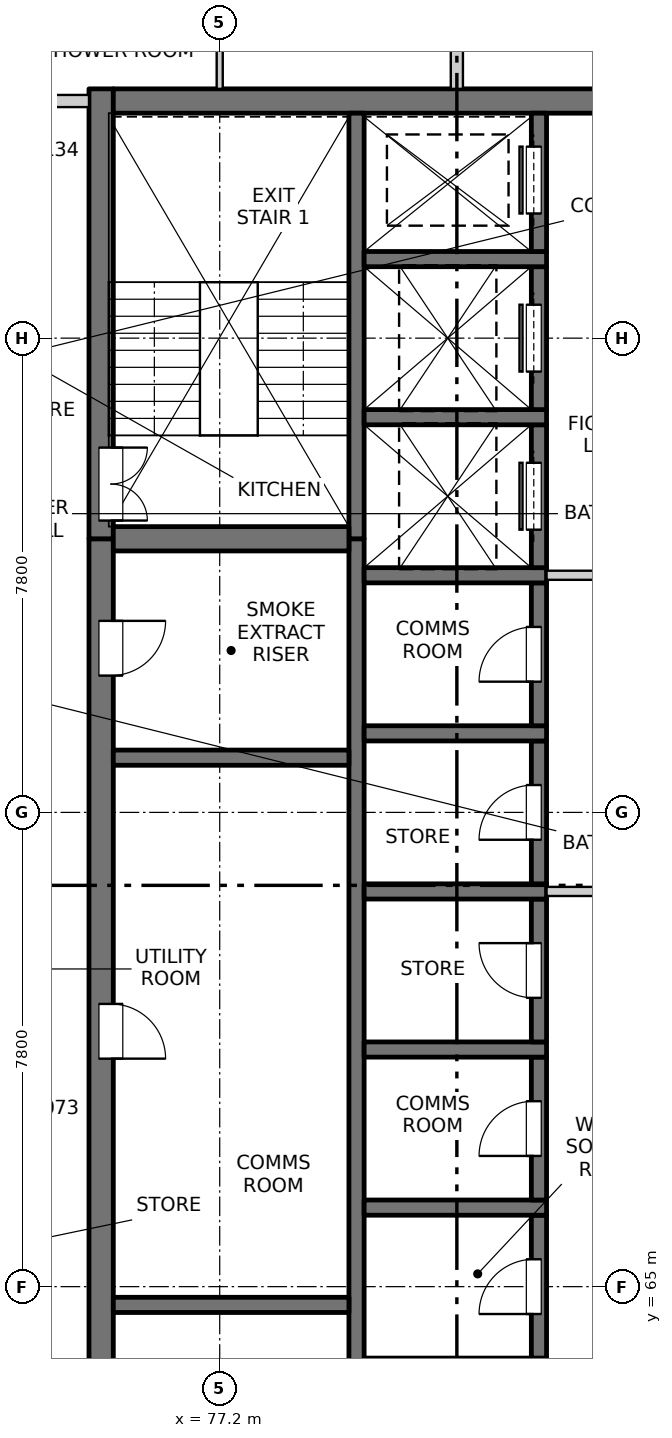
"""IFC4 building model, lengths in metres.
Left out: names, types, materials, properties, quantities, classifications, styles, units other than length and angle.
Written with IfcOpenShell. Run it as: python <this file> out.ifc"""

import sys

from ifc_helpers import new_model, si_unit, direction, frame, frame_2d, origin, place, context, subcontext, project, spatial, rectangle, extrude, element, fill, save


model = new_model("IFC4")
c1 = context("Model", 3, precision=1e-05, world=origin(), true_north=direction((0.0, 1.0)))
c2 = subcontext(c1, "Body", "Model", "MODEL_VIEW")
j1 = project(units=[si_unit("LENGTHUNIT", "METRE"), si_unit("PLANEANGLEUNIT", "RADIAN")], contexts=[c1])
p1 = place(None, origin())
s1 = spatial("IfcSite", under=j1, at=p1, CompositionType="ELEMENT")
p2 = place(p1, origin())
s2 = spatial("IfcBuilding", under=s1, at=p2, CompositionType="ELEMENT")
p3 = place(p2, frame((0.0, 0.0, 197.3)))
s3 = spatial("IfcBuildingStorey", under=s2, at=p3, CompositionType="ELEMENT", Elevation=197.3)
p4 = place(p3, frame((75.25, 55.05, -0.3), z_axis=(0.0, 0.0, 1.0), x_axis=(0.0, 1.0, 0.0)))
e1 = element("IfcWall", 1, at=p4, inside=s3, PredefinedType="SOLIDWALL", context=c2, shape_type="SweptSolid", body=[
    extrude(rectangle(XDim=22.25, YDim=0.4, at=frame_2d((11.125, 0.0))), origin(), (0.0, 0.0, 1.0), 3.45),
])
p5 = place(p4, frame((7.4, 0.0, 0.3)))
e2 = element("IfcOpeningElement", 2, at=p5, cuts=e1, PredefinedType="OPENING", context=c2, shape_type="SweptSolid", body=[
    extrude(rectangle(XDim=0.9, YDim=2.1, at=frame_2d((0.45, 1.05))), frame((0.0, 0.21, 0.0), z_axis=(0.0, -1.0, 0.0), x_axis=(1.0, 0.0, 0.0)), (0.0, 0.0, 1.0), 0.42),
])
p6 = place(p4, frame((13.7, 0.0, 0.3)))
e3 = element("IfcOpeningElement", 3, at=p6, cuts=e1, PredefinedType="OPENING", context=c2, shape_type="SweptSolid", body=[
    extrude(rectangle(XDim=0.9, YDim=2.1, at=frame_2d((0.45, 1.05))), frame((0.0, 0.21, 0.0), z_axis=(0.0, -1.0, 0.0), x_axis=(1.0, 0.0, 0.0)), (0.0, 0.0, 1.0), 0.42),
])
p7 = place(p4, frame((20.0, 0.0, 0.3)))
e4 = element("IfcOpeningElement", 4, at=p7, cuts=e1, PredefinedType="OPENING", context=c2, shape_type="SweptSolid", body=[
    extrude(rectangle(XDim=0.9, YDim=2.1, at=frame_2d((0.45, 1.05))), frame((0.0, 0.21, 0.0), z_axis=(0.0, -1.0, 0.0), x_axis=(1.0, 0.0, 0.0)), (0.0, 0.0, 1.0), 0.42),
])
p8 = place(p3, frame((75.25, 77.3, -0.3), z_axis=(0.0, 0.0, 1.0), x_axis=(0.0, 1.0, 0.0)))
e5 = element("IfcWall", 5, at=p8, inside=s3, PredefinedType="SOLIDWALL", context=c2, shape_type="SweptSolid", body=[
    extrude(rectangle(XDim=7.4, YDim=0.4, at=frame_2d((3.7, 0.0))), origin(), (0.0, 0.0, 1.0), 3.45),
])
p9 = place(p8, frame((0.3, 0.0, 0.3)))
e6 = element("IfcOpeningElement", 6, at=p9, cuts=e5, PredefinedType="OPENING", context=c2, shape_type="SweptSolid", body=[
    extrude(rectangle(XDim=1.2, YDim=2.1, at=frame_2d((0.6, 1.05))), frame((0.0, 0.21, 0.0), z_axis=(0.0, -1.0, 0.0), x_axis=(1.0, 0.0, 0.0)), (0.0, 0.0, 1.0), 0.42),
])
p10 = place(p3, frame((75.45, 84.5, -0.3), z_axis=(0.0, 0.0, 1.0), x_axis=(1.0, 0.0, 0.0)))
e7 = element("IfcWall", 7, at=p10, inside=s3, PredefinedType="SOLIDWALL", context=c2, shape_type="SweptSolid", body=[
    extrude(rectangle(XDim=19.1, YDim=0.4, at=frame_2d((9.55, 0.0))), origin(), (0.0, 0.0, 1.0), 3.45),
])
p11 = place(p3, frame((79.45, 60.975, -0.3), z_axis=(0.0, 0.0, 1.0), x_axis=(0.0, 1.0, 0.0)))
e8 = element("IfcWall", 8, at=p11, inside=s3, PredefinedType="SOLIDWALL", context=c2, shape_type="SweptSolid", body=[
    extrude(rectangle(XDim=16.325, YDim=0.25, at=frame_2d((8.163, 0.0))), origin(), (0.0, 0.0, 1.0), 3.45),
])
p12 = place(p3, frame((79.45, 77.3, -0.3), z_axis=(0.0, 0.0, 1.0), x_axis=(0.0, 1.0, 0.0)))
e9 = element("IfcWall", 9, at=p12, inside=s3, PredefinedType="SOLIDWALL", context=c2, shape_type="SweptSolid", body=[
    extrude(rectangle(XDim=7.0, YDim=0.25, at=frame_2d((3.5, 0.0))), origin(), (0.0, 0.0, 1.0), 3.45),
])
p13 = place(p3, frame((82.45, 63.825, -0.3), z_axis=(0.0, 0.0, 1.0), x_axis=(0.0, 1.0, 0.0)))
e10 = element("IfcWall", 10, at=p13, inside=s3, PredefinedType="SOLIDWALL", context=c2, shape_type="SweptSolid", body=[
    extrude(rectangle(XDim=2.35, YDim=0.25, at=frame_2d((1.175, 0.0))), origin(), (0.0, 0.0, 1.0), 3.45),
])
p14 = place(p13, frame((0.725, 0.0, 0.3)))
e11 = element("IfcOpeningElement", 11, at=p14, cuts=e10, PredefinedType="OPENING", context=c2, shape_type="SweptSolid", body=[
    extrude(rectangle(XDim=0.9, YDim=2.1, at=frame_2d((0.45, 1.05))), frame((0.0, 0.135, 0.0), z_axis=(0.0, -1.0, 0.0), x_axis=(1.0, 0.0, 0.0)), (0.0, 0.0, 1.0), 0.27),
])
p15 = place(p3, frame((79.575, 66.3, -0.3), z_axis=(0.0, 0.0, 1.0), x_axis=(1.0, 0.0, 0.0)))
e12 = element("IfcWall", 12, at=p15, inside=s3, PredefinedType="SOLIDWALL", context=c2, shape_type="SweptSolid", body=[
    extrude(rectangle(XDim=3.0, YDim=0.25, at=frame_2d((1.5, 0.0))), origin(), (0.0, 0.0, 1.0), 3.45),
])
p16 = place(p3, frame((82.45, 66.425, -0.3), z_axis=(0.0, 0.0, 1.0), x_axis=(0.0, 1.0, 0.0)))
e13 = element("IfcWall", 13, at=p16, inside=s3, PredefinedType="SOLIDWALL", context=c2, shape_type="SweptSolid", body=[
    extrude(rectangle(XDim=2.35, YDim=0.25, at=frame_2d((1.175, 0.0))), origin(), (0.0, 0.0, 1.0), 3.45),
])
p17 = place(p16, frame((0.725, 0.0, 0.3)))
e14 = element("IfcOpeningElement", 14, at=p17, cuts=e13, PredefinedType="OPENING", context=c2, shape_type="SweptSolid", body=[
    extrude(rectangle(XDim=0.9, YDim=2.1, at=frame_2d((0.45, 1.05))), frame((0.0, 0.135, 0.0), z_axis=(0.0, -1.0, 0.0), x_axis=(1.0, 0.0, 0.0)), (0.0, 0.0, 1.0), 0.27),
])
p18 = place(p3, frame((79.575, 68.9, -0.3), z_axis=(0.0, 0.0, 1.0), x_axis=(1.0, 0.0, 0.0)))
e15 = element("IfcWall", 15, at=p18, inside=s3, PredefinedType="SOLIDWALL", context=c2, shape_type="SweptSolid", body=[
    extrude(rectangle(XDim=3.0, YDim=0.25, at=frame_2d((1.5, 0.0))), origin(), (0.0, 0.0, 1.0), 3.45),
])
p19 = place(p3, frame((82.45, 69.025, -0.3), z_axis=(0.0, 0.0, 1.0), x_axis=(0.0, 1.0, 0.0)))
e16 = element("IfcWall", 16, at=p19, inside=s3, PredefinedType="SOLIDWALL", context=c2, shape_type="SweptSolid", body=[
    extrude(rectangle(XDim=2.35, YDim=0.25, at=frame_2d((1.175, 0.0))), origin(), (0.0, 0.0, 1.0), 3.45),
])
p20 = place(p19, frame((0.725, 0.0, 0.3)))
e17 = element("IfcOpeningElement", 17, at=p20, cuts=e16, PredefinedType="OPENING", context=c2, shape_type="SweptSolid", body=[
    extrude(rectangle(XDim=0.9, YDim=2.1, at=frame_2d((0.45, 1.05))), frame((0.0, 0.135, 0.0), z_axis=(0.0, -1.0, 0.0), x_axis=(1.0, 0.0, 0.0)), (0.0, 0.0, 1.0), 0.27),
])
p21 = place(p3, frame((79.575, 71.5, -0.3), z_axis=(0.0, 0.0, 1.0), x_axis=(1.0, 0.0, 0.0)))
e18 = element("IfcWall", 18, at=p21, inside=s3, PredefinedType="SOLIDWALL", context=c2, shape_type="SweptSolid", body=[
    extrude(rectangle(XDim=3.0, YDim=0.25, at=frame_2d((1.5, 0.0))), origin(), (0.0, 0.0, 1.0), 3.45),
])
p22 = place(p3, frame((82.45, 71.625, -0.3), z_axis=(0.0, 0.0, 1.0), x_axis=(0.0, 1.0, 0.0)))
e19 = element("IfcWall", 19, at=p22, inside=s3, PredefinedType="SOLIDWALL", context=c2, shape_type="SweptSolid", body=[
    extrude(rectangle(XDim=2.35, YDim=0.25, at=frame_2d((1.175, 0.0))), origin(), (0.0, 0.0, 1.0), 3.45),
])
p23 = place(p22, frame((0.725, 0.0, 0.3)))
e20 = element("IfcOpeningElement", 20, at=p23, cuts=e19, PredefinedType="OPENING", context=c2, shape_type="SweptSolid", body=[
    extrude(rectangle(XDim=0.9, YDim=2.1, at=frame_2d((0.45, 1.05))), frame((0.0, 0.135, 0.0), z_axis=(0.0, -1.0, 0.0), x_axis=(1.0, 0.0, 0.0)), (0.0, 0.0, 1.0), 0.27),
])
p24 = place(p3, frame((79.575, 74.1, -0.3), z_axis=(0.0, 0.0, 1.0), x_axis=(1.0, 0.0, 0.0)))
e21 = element("IfcWall", 21, at=p24, inside=s3, PredefinedType="SOLIDWALL", context=c2, shape_type="SweptSolid", body=[
    extrude(rectangle(XDim=3.0, YDim=0.25, at=frame_2d((1.5, 0.0))), origin(), (0.0, 0.0, 1.0), 3.45),
])
p25 = place(p3, frame((82.45, 74.225, -0.3), z_axis=(0.0, 0.0, 1.0), x_axis=(0.0, 1.0, 0.0)))
e22 = element("IfcWall", 22, at=p25, inside=s3, PredefinedType="SOLIDWALL", context=c2, shape_type="SweptSolid", body=[
    extrude(rectangle(XDim=2.35, YDim=0.25, at=frame_2d((1.175, 0.0))), origin(), (0.0, 0.0, 1.0), 3.45),
])
p26 = place(p25, frame((0.725, 0.0, 0.3)))
e23 = element("IfcOpeningElement", 23, at=p26, cuts=e22, PredefinedType="OPENING", context=c2, shape_type="SweptSolid", body=[
    extrude(rectangle(XDim=0.9, YDim=2.1, at=frame_2d((0.45, 1.05))), frame((0.0, 0.135, 0.0), z_axis=(0.0, -1.0, 0.0), x_axis=(1.0, 0.0, 0.0)), (0.0, 0.0, 1.0), 0.27),
])
p27 = place(p3, frame((79.575, 76.7, -0.3), z_axis=(0.0, 0.0, 1.0), x_axis=(1.0, 0.0, 0.0)))
e24 = element("IfcWall", 24, at=p27, inside=s3, PredefinedType="SOLIDWALL", context=c2, shape_type="SweptSolid", body=[
    extrude(rectangle(XDim=3.0, YDim=0.25, at=frame_2d((1.5, 0.0))), origin(), (0.0, 0.0, 1.0), 3.45),
])
p28 = place(p3, frame((82.45, 76.825, -0.3), z_axis=(0.0, 0.0, 1.0), x_axis=(0.0, 1.0, 0.0)))
e25 = element("IfcWall", 25, at=p28, inside=s3, PredefinedType="SOLIDWALL", context=c2, shape_type="SweptSolid", body=[
    extrude(rectangle(XDim=2.35, YDim=0.25, at=frame_2d((1.175, 0.0))), origin(), (0.0, 0.0, 1.0), 3.45),
])
p29 = place(p28, frame((0.625, 0.0, 0.3)))
e26 = element("IfcOpeningElement", 26, at=p29, cuts=e25, PredefinedType="OPENING", context=c2, shape_type="SweptSolid", body=[
    extrude(rectangle(XDim=1.1, YDim=2.1, at=frame_2d((0.55, 1.05))), frame((0.0, 0.135, 0.0), z_axis=(0.0, -1.0, 0.0), x_axis=(1.0, 0.0, 0.0)), (0.0, 0.0, 1.0), 0.27),
])
p30 = place(p3, frame((79.575, 79.3, -0.3), z_axis=(0.0, 0.0, 1.0), x_axis=(1.0, 0.0, 0.0)))
e27 = element("IfcWall", 27, at=p30, inside=s3, PredefinedType="SOLIDWALL", context=c2, shape_type="SweptSolid", body=[
    extrude(rectangle(XDim=3.0, YDim=0.25, at=frame_2d((1.5, 0.0))), origin(), (0.0, 0.0, 1.0), 3.45),
])
p31 = place(p3, frame((82.45, 79.425, -0.3), z_axis=(0.0, 0.0, 1.0), x_axis=(0.0, 1.0, 0.0)))
e28 = element("IfcWall", 28, at=p31, inside=s3, PredefinedType="SOLIDWALL", context=c2, shape_type="SweptSolid", body=[
    extrude(rectangle(XDim=2.35, YDim=0.25, at=frame_2d((1.175, 0.0))), origin(), (0.0, 0.0, 1.0), 3.45),
])
p32 = place(p31, frame((0.625, 0.0, 0.3)))
e29 = element("IfcOpeningElement", 29, at=p32, cuts=e28, PredefinedType="OPENING", context=c2, shape_type="SweptSolid", body=[
    extrude(rectangle(XDim=1.1, YDim=2.1, at=frame_2d((0.55, 1.05))), frame((0.0, 0.135, 0.0), z_axis=(0.0, -1.0, 0.0), x_axis=(1.0, 0.0, 0.0)), (0.0, 0.0, 1.0), 0.27),
])
p33 = place(p3, frame((79.575, 81.9, -0.3), z_axis=(0.0, 0.0, 1.0), x_axis=(1.0, 0.0, 0.0)))
e30 = element("IfcWall", 30, at=p33, inside=s3, PredefinedType="SOLIDWALL", context=c2, shape_type="SweptSolid", body=[
    extrude(rectangle(XDim=3.0, YDim=0.25, at=frame_2d((1.5, 0.0))), origin(), (0.0, 0.0, 1.0), 3.45),
])
p34 = place(p3, frame((82.45, 82.025, -0.3), z_axis=(0.0, 0.0, 1.0), x_axis=(0.0, 1.0, 0.0)))
e31 = element("IfcWall", 31, at=p34, inside=s3, PredefinedType="SOLIDWALL", context=c2, shape_type="SweptSolid", body=[
    extrude(rectangle(XDim=2.275, YDim=0.25, at=frame_2d((1.138, 0.0))), origin(), (0.0, 0.0, 1.0), 3.45),
])
p35 = place(p34, frame((0.625, 0.0, 0.3)))
e32 = element("IfcOpeningElement", 32, at=p35, cuts=e31, PredefinedType="OPENING", context=c2, shape_type="SweptSolid", body=[
    extrude(rectangle(XDim=1.1, YDim=2.1, at=frame_2d((0.55, 1.05))), frame((0.0, 0.135, 0.0), z_axis=(0.0, -1.0, 0.0), x_axis=(1.0, 0.0, 0.0)), (0.0, 0.0, 1.0), 0.27),
])
for number, where, z_axis, x_axis in (
    (33, (75.45, 64.7, -0.3), (0.0, 0.0, 1.0), (1.0, 0.0, 0.0)),
    (34, (75.45, 73.7, -0.3), (0.0, 0.0, 1.0), (1.0, 0.0, 0.0)),
):
    element("IfcWall", number, at=place(p3, frame(where, z_axis=z_axis, x_axis=x_axis)), inside=s3, PredefinedType="SOLIDWALL", context=c2, shape_type="SweptSolid", body=[
        extrude(rectangle(XDim=3.875, YDim=0.25, at=frame_2d((1.938, 0.0))), origin(), (0.0, 0.0, 1.0), 3.45),
    ])
p36 = place(p3, frame((75.45, 77.3, -0.3), z_axis=(0.0, 0.0, 1.0), x_axis=(1.0, 0.0, 0.0)))
e35 = element("IfcWall", 35, at=p36, inside=s3, PredefinedType="SOLIDWALL", context=c2, shape_type="SweptSolid", body=[
    extrude(rectangle(XDim=3.875, YDim=0.4, at=frame_2d((1.938, 0.0))), origin(), (0.0, 0.0, 1.0), 3.45),
])
p37 = place(p3, frame((82.575, 71.5, 0.0), z_axis=(0.0, 0.0, 1.0), x_axis=(1.0, 0.0, 0.0)))
e36 = element("IfcWall", 36, at=p37, inside=s3, PredefinedType="PARTITIONING", context=c2, shape_type="SweptSolid", body=[
    extrude(rectangle(XDim=4.85, YDim=0.15, at=frame_2d((2.425, 0.0))), origin(), (0.0, 0.0, 1.0), 3.15),
])
p38 = place(p37, frame((1.525, 0.0, 0.0)))
e37 = element("IfcOpeningElement", 37, at=p38, cuts=e36, PredefinedType="OPENING", context=c2, shape_type="SweptSolid", body=[
    extrude(rectangle(XDim=1.8, YDim=2.1, at=frame_2d((0.9, 1.05))), frame((0.0, 0.085, 0.0), z_axis=(0.0, -1.0, 0.0), x_axis=(1.0, 0.0, 0.0)), (0.0, 0.0, 1.0), 0.17),
])
p39 = place(p3, frame((82.575, 76.7, 0.0), z_axis=(0.0, 0.0, 1.0), x_axis=(1.0, 0.0, 0.0)))
e38 = element("IfcWall", 38, at=p39, inside=s3, PredefinedType="PARTITIONING", context=c2, shape_type="SweptSolid", body=[
    extrude(rectangle(XDim=4.85, YDim=0.15, at=frame_2d((2.425, 0.0))), origin(), (0.0, 0.0, 1.0), 3.15),
])
p40 = place(p39, frame((1.525, 0.0, 0.0)))
e39 = element("IfcOpeningElement", 39, at=p40, cuts=e38, PredefinedType="OPENING", context=c2, shape_type="SweptSolid", body=[
    extrude(rectangle(XDim=1.8, YDim=2.1, at=frame_2d((0.9, 1.05))), frame((0.0, 0.085, 0.0), z_axis=(0.0, -1.0, 0.0), x_axis=(1.0, 0.0, 0.0)), (0.0, 0.0, 1.0), 0.17),
])
p41 = place(p3, frame((73.2, 84.5, 0.0), z_axis=(0.0, 0.0, 1.0), x_axis=(1.0, 0.0, 0.0)))
e40 = element("IfcWall", 40, at=p41, inside=s3, PredefinedType="PARTITIONING", context=c2, shape_type="SweptSolid", body=[
    extrude(rectangle(XDim=1.85, YDim=0.2, at=frame_2d((0.925, 0.0))), origin(), (0.0, 0.0, 1.0), 3.15),
])
p42 = place(p3, frame((77.2, 84.7, 0.0), z_axis=(0.0, 0.0, 1.0), x_axis=(0.0, 1.0, 0.0)))
e41 = element("IfcWall", 41, at=p42, inside=s3, PredefinedType="PARTITIONING", context=c2, shape_type="SweptSolid", body=[
    extrude(rectangle(XDim=3.4, YDim=0.1, at=frame_2d((1.7, 0.0))), origin(), (0.0, 0.0, 1.0), 3.15),
])
p43 = place(p42, frame((1.3, 0.0, 0.0)))
e42 = element("IfcOpeningElement", 42, at=p43, cuts=e41, PredefinedType="OPENING", context=c2, shape_type="SweptSolid", body=[
    extrude(rectangle(XDim=0.9, YDim=2.1, at=frame_2d((0.45, 1.05))), frame((0.0, 0.06, 0.0), z_axis=(0.0, -1.0, 0.0), x_axis=(1.0, 0.0, 0.0)), (0.0, 0.0, 1.0), 0.12),
])
p44 = place(p3, frame((81.1, 84.7, 0.0), z_axis=(0.0, 0.0, 1.0), x_axis=(0.0, 1.0, 0.0)))
e43 = element("IfcWall", 43, at=p44, inside=s3, PredefinedType="PARTITIONING", context=c2, shape_type="SweptSolid", body=[
    extrude(rectangle(XDim=3.4, YDim=0.2, at=frame_2d((1.7, 0.0))), origin(), (0.0, 0.0, 1.0), 3.15),
])
p45 = place(p14, origin())
e44 = element("IfcDoor", 44, at=p45, inside=s3, OperationType="SINGLE_SWING_LEFT", PredefinedType="DOOR", context=c2, shape_type="SweptSolid", body=[
    extrude(rectangle(XDim=0.9, YDim=2.1, at=frame_2d((0.45, 1.05))), frame((0.0, 0.11, 0.0), z_axis=(0.0, -1.0, 0.0), x_axis=(1.0, 0.0, 0.0)), (0.0, 0.0, 1.0), 0.05),
])
fill(e11, e44)
p46 = place(p17, origin())
e45 = element("IfcDoor", 45, at=p46, inside=s3, OperationType="SINGLE_SWING_LEFT", PredefinedType="DOOR", context=c2, shape_type="SweptSolid", body=[
    extrude(rectangle(XDim=0.9, YDim=2.1, at=frame_2d((0.45, 1.05))), frame((0.0, 0.11, 0.0), z_axis=(0.0, -1.0, 0.0), x_axis=(1.0, 0.0, 0.0)), (0.0, 0.0, 1.0), 0.05),
])
fill(e14, e45)
p47 = place(p6, origin())
e46 = element("IfcDoor", 46, at=p47, inside=s3, OperationType="SINGLE_SWING_RIGHT", PredefinedType="DOOR", context=c2, shape_type="SweptSolid", body=[
    extrude(rectangle(XDim=0.9, YDim=2.1, at=frame_2d((0.45, 1.05))), frame((0.0, -0.135, 0.0), z_axis=(0.0, -1.0, 0.0), x_axis=(1.0, 0.0, 0.0)), (0.0, 0.0, 1.0), 0.05),
])
fill(e3, e46)
p48 = place(p20, origin())
e47 = element("IfcDoor", 47, at=p48, inside=s3, OperationType="SINGLE_SWING_RIGHT", PredefinedType="DOOR", context=c2, shape_type="SweptSolid", body=[
    extrude(rectangle(XDim=0.9, YDim=2.1, at=frame_2d((0.45, 1.05))), frame((0.0, 0.11, 0.0), z_axis=(0.0, -1.0, 0.0), x_axis=(1.0, 0.0, 0.0)), (0.0, 0.0, 1.0), 0.05),
])
fill(e17, e47)
p49 = place(p23, origin())
e48 = element("IfcDoor", 48, at=p49, inside=s3, OperationType="SINGLE_SWING_LEFT", PredefinedType="DOOR", context=c2, shape_type="SweptSolid", body=[
    extrude(rectangle(XDim=0.9, YDim=2.1, at=frame_2d((0.45, 1.05))), frame((0.0, 0.11, 0.0), z_axis=(0.0, -1.0, 0.0), x_axis=(1.0, 0.0, 0.0)), (0.0, 0.0, 1.0), 0.05),
])
fill(e20, e48)
p50 = place(p26, origin())
e49 = element("IfcDoor", 49, at=p50, inside=s3, OperationType="SINGLE_SWING_LEFT", PredefinedType="DOOR", context=c2, shape_type="SweptSolid", body=[
    extrude(rectangle(XDim=0.9, YDim=2.1, at=frame_2d((0.45, 1.05))), frame((0.0, 0.11, 0.0), z_axis=(0.0, -1.0, 0.0), x_axis=(1.0, 0.0, 0.0)), (0.0, 0.0, 1.0), 0.05),
])
fill(e23, e49)
p51 = place(p7, origin())
e50 = element("IfcDoor", 50, at=p51, inside=s3, OperationType="SINGLE_SWING_LEFT", PredefinedType="DOOR", context=c2, shape_type="SweptSolid", body=[
    extrude(rectangle(XDim=0.9, YDim=2.1, at=frame_2d((0.45, 1.05))), frame((0.0, -0.135, 0.0), z_axis=(0.0, -1.0, 0.0), x_axis=(1.0, 0.0, 0.0)), (0.0, 0.0, 1.0), 0.05),
])
fill(e4, e50)
p52 = place(p29, origin())
e51 = element("IfcDoor", 51, at=p52, inside=s3, OperationType="SLIDING_TO_LEFT", PredefinedType="DOOR", context=c2, shape_type="SweptSolid", body=[
    extrude(rectangle(XDim=1.1, YDim=2.1, at=frame_2d((0.55, 1.05))), frame((0.0, 0.11, 0.0), z_axis=(0.0, -1.0, 0.0), x_axis=(1.0, 0.0, 0.0)), (0.0, 0.0, 1.0), 0.05),
])
fill(e26, e51)
p53 = place(p9, origin())
e52 = element("IfcDoor", 52, at=p53, inside=s3, OperationType="DOUBLE_DOOR_SINGLE_SWING", PredefinedType="DOOR", context=c2, shape_type="SweptSolid", body=[
    extrude(rectangle(XDim=1.2, YDim=2.1, at=frame_2d((0.6, 1.05))), frame((0.0, -0.135, 0.0), z_axis=(0.0, -1.0, 0.0), x_axis=(1.0, 0.0, 0.0)), (0.0, 0.0, 1.0), 0.05),
])
fill(e6, e52)
p54 = place(p32, origin())
e53 = element("IfcDoor", 53, at=p54, inside=s3, OperationType="SLIDING_TO_LEFT", PredefinedType="DOOR", context=c2, shape_type="SweptSolid", body=[
    extrude(rectangle(XDim=1.1, YDim=2.1, at=frame_2d((0.55, 1.05))), frame((0.0, 0.11, 0.0), z_axis=(0.0, -1.0, 0.0), x_axis=(1.0, 0.0, 0.0)), (0.0, 0.0, 1.0), 0.05),
])
fill(e29, e53)
p55 = place(p35, origin())
e54 = element("IfcDoor", 54, at=p55, inside=s3, OperationType="SLIDING_TO_RIGHT", PredefinedType="DOOR", context=c2, shape_type="SweptSolid", body=[
    extrude(rectangle(XDim=1.1, YDim=2.1, at=frame_2d((0.55, 1.05))), frame((0.0, 0.11, 0.0), z_axis=(0.0, -1.0, 0.0), x_axis=(1.0, 0.0, 0.0)), (0.0, 0.0, 1.0), 0.05),
])
fill(e32, e54)
save(model, sys.argv[1])
